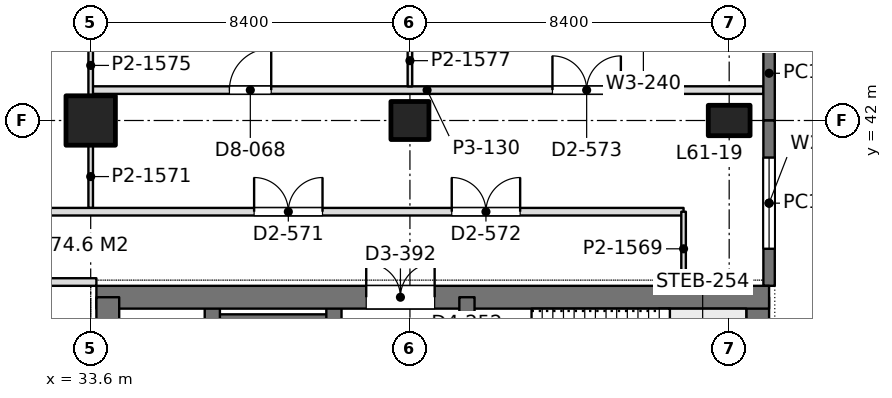
"""IFC4 building model, lengths in metres.
Left out: names, types, materials, properties, quantities, classifications, styles, units other than length and angle.
Written with IfcOpenShell. Run it as: python <this file> out.ifc"""

import sys

from ifc_helpers import new_model, si_unit, direction, frame, frame_2d, origin, origin_2d, place, context, subcontext, project, spatial, rectangle, extrude, element, fill, save


model = new_model("IFC4")
c1 = context("Model", 3, precision=1e-05, world=origin(), true_north=direction((0.0, 1.0)))
c2 = subcontext(c1, "Body", "Model", "MODEL_VIEW")
j1 = project(units=[si_unit("LENGTHUNIT", "METRE"), si_unit("PLANEANGLEUNIT", "RADIAN")], contexts=[c1])
p1 = place(None, origin())
s1 = spatial("IfcSite", under=j1, at=p1, CompositionType="ELEMENT")
p2 = place(p1, origin())
s2 = spatial("IfcBuilding", under=s1, at=p2, CompositionType="ELEMENT")
p3 = place(p2, frame((0.0, 0.0, 268.2)))
s3 = spatial("IfcBuildingStorey", under=s2, at=p3, CompositionType="ELEMENT", Elevation=268.2)
p4 = place(p3, frame((33.6, 42.0, 0.0), z_axis=(0.0, 0.0, 1.0), x_axis=(1.0, 0.0, 0.0)))
e1 = element("IfcColumn", 1, at=p4, inside=s3, PredefinedType="COLUMN", context=c2, shape_type="SweptSolid", body=[
    extrude(rectangle(XDim=1.3, YDim=1.3, at=origin_2d()), origin(), (0.0, 0.0, 1.0), 4.5),
])
p5 = place(p3, frame((42.0, 42.0, 0.0), z_axis=(0.0, 0.0, 1.0), x_axis=(1.0, 0.0, 0.0)))
e2 = element("IfcColumn", 2, at=p5, inside=s3, PredefinedType="COLUMN", context=c2, shape_type="SweptSolid", body=[
    extrude(rectangle(XDim=1.0, YDim=1.0, at=origin_2d()), origin(), (0.0, 0.0, 1.0), 4.5),
])
p6 = place(p3, frame((50.4, 42.0, 0.0), z_axis=(0.0, 0.0, 1.0), x_axis=(0.0, 1.0, 0.0)))
e3 = element("IfcColumn", 3, at=p6, inside=s3, PredefinedType="COLUMN", context=c2, shape_type="SweptSolid", body=[
    extrude(rectangle(XDim=0.8, YDim=1.1, at=origin_2d()), origin(), (0.0, 0.0, 1.0), 4.5),
])
p7 = place(p3, frame((33.75, 37.35, 0.0), z_axis=(0.0, 0.0, 1.0), x_axis=(1.0, 0.0, 0.0)))
e4 = element("IfcWall", 4, at=p7, inside=s3, PredefinedType="SHEAR", context=c2, shape_type="SweptSolid", body=[
    extrude(rectangle(XDim=17.7, YDim=0.6, at=frame_2d((8.85, 0.0))), origin(), (0.0, 0.0, 1.0), 4.5),
])
p8 = place(p7, frame((7.1, 0.0, 0.0)))
e5 = element("IfcOpeningElement", 5, at=p8, cuts=e4, PredefinedType="OPENING", context=c2, shape_type="SweptSolid", body=[
    extrude(rectangle(XDim=1.8, YDim=2.4, at=frame_2d((0.9, 1.2))), frame((0.0, 0.31, 0.0), z_axis=(0.0, -1.0, 0.0), x_axis=(1.0, 0.0, 0.0)), (0.0, 0.0, 1.0), 0.62),
])
p9 = place(p3, frame((34.05, 27.8, 0.0), z_axis=(0.0, 0.0, 1.0), x_axis=(0.0, 1.0, 0.0)))
e6 = element("IfcWall", 6, at=p9, inside=s3, PredefinedType="SHEAR", context=c2, shape_type="SweptSolid", body=[
    extrude(rectangle(XDim=9.55, YDim=0.6, at=frame_2d((4.775, 0.0))), origin(), (0.0, 0.0, 1.0), 4.5),
])
p10 = place(p3, frame((51.15, 13.05, 0.0), z_axis=(0.0, 0.0, 1.0), x_axis=(0.0, 1.0, 0.0)))
e7 = element("IfcWall", 7, at=p10, inside=s3, PredefinedType="SHEAR", context=c2, shape_type="SweptSolid", body=[
    extrude(rectangle(XDim=24.3, YDim=0.6, at=frame_2d((12.15, 0.0))), origin(), (0.0, 0.0, 1.0), 4.5),
])
p11 = place(p3, frame((43.5, 13.05, 0.0), z_axis=(0.0, 0.0, 1.0), x_axis=(0.0, 1.0, 0.0)))
e8 = element("IfcWall", 8, at=p11, inside=s3, PredefinedType="SHEAR", context=c2, shape_type="SweptSolid", body=[
    extrude(rectangle(XDim=24.3, YDim=0.4, at=frame_2d((12.15, 0.0))), origin(), (0.0, 0.0, 1.0), 4.5),
])
p12 = place(p11, frame((1.3, 0.0, 0.0)))
e9 = element("IfcOpeningElement", 9, at=p12, cuts=e8, PredefinedType="OPENING", context=c2, shape_type="SweptSolid", body=[
    extrude(rectangle(XDim=1.0, YDim=2.2, at=frame_2d((0.5, 1.1))), frame((0.0, 0.21, 0.0), z_axis=(0.0, -1.0, 0.0), x_axis=(1.0, 0.0, 0.0)), (0.0, 0.0, 1.0), 0.42),
])
p13 = place(p11, frame((22.0, 0.0, 0.0)))
e10 = element("IfcOpeningElement", 10, at=p13, cuts=e8, PredefinedType="OPENING", context=c2, shape_type="SweptSolid", body=[
    extrude(rectangle(XDim=1.0, YDim=2.2, at=frame_2d((0.5, 1.1))), frame((0.0, 0.21, 0.0), z_axis=(0.0, -1.0, 0.0), x_axis=(1.0, 0.0, 0.0)), (0.0, 0.0, 1.0), 0.42),
])
p14 = place(p11, frame((5.55, 0.0, 0.0)))
e11 = element("IfcOpeningElement", 11, at=p14, cuts=e8, PredefinedType="OPENING", context=c2, shape_type="SweptSolid", body=[
    extrude(rectangle(XDim=1.0, YDim=2.2, at=frame_2d((0.5, 1.1))), frame((0.0, 0.21, 0.0), z_axis=(0.0, -1.0, 0.0), x_axis=(1.0, 0.0, 0.0)), (0.0, 0.0, 1.0), 0.42),
])
p15 = place(p11, frame((9.55, 0.0, 0.0)))
e12 = element("IfcOpeningElement", 12, at=p15, cuts=e8, PredefinedType="OPENING", context=c2, shape_type="SweptSolid", body=[
    extrude(rectangle(XDim=1.0, YDim=2.2, at=frame_2d((0.5, 1.1))), frame((0.0, 0.21, 0.0), z_axis=(0.0, -1.0, 0.0), x_axis=(1.0, 0.0, 0.0)), (0.0, 0.0, 1.0), 0.42),
])
p16 = place(p11, frame((12.8, 0.0, 0.0)))
e13 = element("IfcOpeningElement", 13, at=p16, cuts=e8, PredefinedType="OPENING", context=c2, shape_type="SweptSolid", body=[
    extrude(rectangle(XDim=1.1, YDim=2.2, at=frame_2d((0.55, 1.1))), frame((0.0, 0.21, 0.0), z_axis=(0.0, -1.0, 0.0), x_axis=(1.0, 0.0, 0.0)), (0.0, 0.0, 1.0), 0.42),
])
p17 = place(p11, frame((15.538, 0.0, 0.0)))
e14 = element("IfcOpeningElement", 14, at=p17, cuts=e8, PredefinedType="OPENING", context=c2, shape_type="SweptSolid", body=[
    extrude(rectangle(XDim=1.1, YDim=2.2, at=frame_2d((0.55, 1.1))), frame((0.0, 0.21, 0.0), z_axis=(0.0, -1.0, 0.0), x_axis=(1.0, 0.0, 0.0)), (0.0, 0.0, 1.0), 0.42),
])
p18 = place(p11, frame((18.262, 0.0, 0.0)))
e15 = element("IfcOpeningElement", 15, at=p18, cuts=e8, PredefinedType="OPENING", context=c2, shape_type="SweptSolid", body=[
    extrude(rectangle(XDim=1.1, YDim=2.2, at=frame_2d((0.55, 1.1))), frame((0.0, 0.21, 0.0), z_axis=(0.0, -1.0, 0.0), x_axis=(1.0, 0.0, 0.0)), (0.0, 0.0, 1.0), 0.42),
])
p19 = place(p3, frame((40.0, 13.05, 0.0), z_axis=(0.0, 0.0, 1.0), x_axis=(0.0, 1.0, 0.0)))
e16 = element("IfcWall", 16, at=p19, inside=s3, PredefinedType="SHEAR", context=c2, shape_type="SweptSolid", body=[
    extrude(rectangle(XDim=24.3, YDim=0.4, at=frame_2d((12.15, 0.0))), origin(), (0.0, 0.0, 1.0), 4.5),
])
p20 = place(p19, frame((15.75, 0.0, 0.0)))
e17 = element("IfcOpeningElement", 17, at=p20, cuts=e16, PredefinedType="OPENING", context=c2, shape_type="SweptSolid", body=[
    extrude(rectangle(XDim=1.1, YDim=2.2, at=frame_2d((0.55, 1.1))), frame((0.0, 0.21, 0.0), z_axis=(0.0, -1.0, 0.0), x_axis=(1.0, 0.0, 0.0)), (0.0, 0.0, 1.0), 0.42),
])
p21 = place(p19, frame((18.6, 0.0, 0.0)))
e18 = element("IfcOpeningElement", 18, at=p21, cuts=e16, PredefinedType="OPENING", context=c2, shape_type="SweptSolid", body=[
    extrude(rectangle(XDim=1.1, YDim=2.2, at=frame_2d((0.55, 1.1))), frame((0.0, 0.21, 0.0), z_axis=(0.0, -1.0, 0.0), x_axis=(1.0, 0.0, 0.0)), (0.0, 0.0, 1.0), 0.42),
])
p22 = place(p19, frame((21.45, 0.0, 0.0)))
e19 = element("IfcOpeningElement", 19, at=p22, cuts=e16, PredefinedType="OPENING", context=c2, shape_type="SweptSolid", body=[
    extrude(rectangle(XDim=1.1, YDim=2.2, at=frame_2d((0.55, 1.1))), frame((0.0, 0.21, 0.0), z_axis=(0.0, -1.0, 0.0), x_axis=(1.0, 0.0, 0.0)), (0.0, 0.0, 1.0), 0.42),
])
p23 = place(p19, frame((8.65, 0.0, 0.0)))
e20 = element("IfcOpeningElement", 20, at=p23, cuts=e16, PredefinedType="OPENING", context=c2, shape_type="SweptSolid", body=[
    extrude(rectangle(XDim=1.8, YDim=2.4, at=frame_2d((0.9, 1.2))), frame((0.0, 0.21, 0.0), z_axis=(0.0, -1.0, 0.0), x_axis=(1.0, 0.0, 0.0)), (0.0, 0.0, 1.0), 0.42),
])
p24 = place(p19, frame((1.5, 0.0, 0.0)))
e21 = element("IfcOpeningElement", 21, at=p24, cuts=e16, PredefinedType="OPENING", context=c2, shape_type="SweptSolid", body=[
    extrude(rectangle(XDim=1.8, YDim=2.4, at=frame_2d((0.9, 1.2))), frame((0.0, 0.21, 0.0), z_axis=(0.0, -1.0, 0.0), x_axis=(1.0, 0.0, 0.0)), (0.0, 0.0, 1.0), 0.42),
])
p25 = place(p3, frame((36.8, 27.925, 0.0), z_axis=(0.0, 0.0, 1.0), x_axis=(0.0, 1.0, 0.0)))
e22 = element("IfcWall", 22, at=p25, inside=s3, PredefinedType="SHEAR", context=c2, shape_type="SweptSolid", body=[
    extrude(rectangle(XDim=9.425, YDim=0.4, at=frame_2d((4.712, 0.0))), origin(), (0.0, 0.0, 1.0), 4.5),
])
p26 = place(p3, frame((40.0, 36.625, 0.0), z_axis=(0.0, 0.0, 1.0), x_axis=(-1.0, 0.0, 0.0)))
e23 = element("IfcWall", 23, at=p26, inside=s3, PredefinedType="SHEAR", context=c2, shape_type="SweptSolid", body=[
    extrude(rectangle(XDim=3.2, YDim=0.55, at=frame_2d((1.6, 0.0))), origin(), (0.0, 0.0, 1.0), 4.5),
])
p27 = place(p3, frame((51.45, 44.485, 0.0), z_axis=(0.0, 0.0, 1.0), x_axis=(0.0, -1.0, 0.0)))
e24 = element("IfcWall", 24, at=p27, inside=s3, PredefinedType="SOLIDWALL", context=c2, shape_type="SweptSolid", body=[
    extrude(rectangle(XDim=2.485, YDim=0.3, at=frame_2d((1.243, 0.0))), origin(), (0.0, 0.0, 1.0), 4.35),
])
p28 = place(p3, frame((51.45, 42.0, 0.0), z_axis=(0.0, 0.0, 1.0), x_axis=(0.0, -1.0, 0.0)))
e25 = element("IfcWall", 25, at=p28, inside=s3, PredefinedType="SOLIDWALL", context=c2, shape_type="SweptSolid", body=[
    extrude(rectangle(XDim=4.35, YDim=0.3, at=frame_2d((2.175, 0.0))), origin(), (0.0, 0.0, 1.0), 4.35),
])
p29 = place(p28, frame((0.975, 0.0, 0.9)))
e26 = element("IfcOpeningElement", 26, at=p29, cuts=e25, PredefinedType="OPENING", context=c2, shape_type="SweptSolid", body=[
    extrude(rectangle(XDim=2.4, YDim=1.9, at=frame_2d((1.2, 0.95))), frame((0.0, 0.16, 0.0), z_axis=(0.0, -1.0, 0.0), x_axis=(1.0, 0.0, 0.0)), (0.0, 0.0, 1.0), 0.32),
])
p30 = place(p3, frame((33.6, 42.8, 0.0), z_axis=(0.0, 0.0, 1.0), x_axis=(1.0, 0.0, 0.0)))
e27 = element("IfcWall", 27, at=p30, inside=s3, PredefinedType="PARTITIONING", context=c2, shape_type="SweptSolid", body=[
    extrude(rectangle(XDim=17.702, YDim=0.2, at=frame_2d((8.851, 0.0))), origin(), (0.0, 0.0, 1.0), 3.86),
])
p31 = place(p30, frame((3.65, 0.0, 0.0)))
e28 = element("IfcOpeningElement", 28, at=p31, cuts=e27, PredefinedType="OPENING", context=c2, shape_type="SweptSolid", body=[
    extrude(rectangle(XDim=1.1, YDim=2.4, at=frame_2d((0.55, 1.2))), frame((0.0, 0.11, 0.0), z_axis=(0.0, -1.0, 0.0), x_axis=(1.0, 0.0, 0.0)), (0.0, 0.0, 1.0), 0.22),
])
p32 = place(p30, frame((12.15, 0.0, 0.0)))
e29 = element("IfcOpeningElement", 29, at=p32, cuts=e27, PredefinedType="OPENING", context=c2, shape_type="SweptSolid", body=[
    extrude(rectangle(XDim=1.8, YDim=2.2, at=frame_2d((0.9, 1.1))), frame((0.0, 0.11, 0.0), z_axis=(0.0, -1.0, 0.0), x_axis=(1.0, 0.0, 0.0)), (0.0, 0.0, 1.0), 0.22),
])
p33 = place(p3, frame((33.6, 42.648, 0.0), z_axis=(0.0, 0.0, 1.0), x_axis=(0.0, 1.0, 0.0)))
e30 = element("IfcWall", 30, at=p33, inside=s3, PredefinedType="PARTITIONING", context=c2, shape_type="SweptSolid", body=[
    extrude(rectangle(XDim=1.603, YDim=0.12, at=frame_2d((0.802, 0.0))), origin(), (0.0, 0.0, 1.0), 3.99),
])
p34 = place(p3, frame((42.0, 42.898, 0.0), z_axis=(0.0, 0.0, 1.0), x_axis=(0.0, 1.0, 0.0)))
e31 = element("IfcWall", 31, at=p34, inside=s3, PredefinedType="PARTITIONING", context=c2, shape_type="SweptSolid", body=[
    extrude(rectangle(XDim=1.353, YDim=0.12, at=frame_2d((0.677, 0.0))), origin(), (0.0, 0.0, 1.0), 3.99),
])
p35 = place(p3, frame((33.6, 39.698, 0.0), z_axis=(0.0, 0.0, 1.0), x_axis=(0.0, 1.0, 0.0)))
e32 = element("IfcWall", 32, at=p35, inside=s3, PredefinedType="PARTITIONING", context=c2, shape_type="SweptSolid", body=[
    extrude(rectangle(XDim=1.653, YDim=0.12, at=frame_2d((0.827, 0.0))), origin(), (0.0, 0.0, 1.0), 3.99),
])
p36 = place(p3, frame((7.748, 39.6, 0.0), z_axis=(0.0, 0.0, 1.0), x_axis=(1.0, 0.0, 0.0)))
e33 = element("IfcWall", 33, at=p36, inside=s3, PredefinedType="PARTITIONING", context=c2, shape_type="SweptSolid", body=[
    extrude(rectangle(XDim=41.452, YDim=0.2, at=frame_2d((20.726, 0.0))), origin(), (0.0, 0.0, 1.0), 3.8),
])
p37 = place(p36, frame((2.119, 0.0, 0.0)))
e34 = element("IfcOpeningElement", 34, at=p37, cuts=e33, PredefinedType="OPENING", context=c2, shape_type="SweptSolid", body=[
    extrude(rectangle(XDim=1.8, YDim=2.2, at=frame_2d((0.9, 1.1))), frame((0.0, 0.11, 0.0), z_axis=(0.0, -1.0, 0.0), x_axis=(1.0, 0.0, 0.0)), (0.0, 0.0, 1.0), 0.22),
])
p38 = place(p36, frame((5.135, 0.0, 0.0)))
e35 = element("IfcOpeningElement", 35, at=p38, cuts=e33, PredefinedType="OPENING", context=c2, shape_type="SweptSolid", body=[
    extrude(rectangle(XDim=1.8, YDim=2.2, at=frame_2d((0.9, 1.1))), frame((0.0, 0.11, 0.0), z_axis=(0.0, -1.0, 0.0), x_axis=(1.0, 0.0, 0.0)), (0.0, 0.0, 1.0), 0.22),
])
p39 = place(p36, frame((12.352, 0.0, 0.0)))
e36 = element("IfcOpeningElement", 36, at=p39, cuts=e33, PredefinedType="OPENING", context=c2, shape_type="SweptSolid", body=[
    extrude(rectangle(XDim=1.8, YDim=2.2, at=frame_2d((0.9, 1.1))), frame((0.0, 0.11, 0.0), z_axis=(0.0, -1.0, 0.0), x_axis=(1.0, 0.0, 0.0)), (0.0, 0.0, 1.0), 0.22),
])
p40 = place(p36, frame((20.752, 0.0, 0.0)))
e37 = element("IfcOpeningElement", 37, at=p40, cuts=e33, PredefinedType="OPENING", context=c2, shape_type="SweptSolid", body=[
    extrude(rectangle(XDim=1.8, YDim=2.2, at=frame_2d((0.9, 1.1))), frame((0.0, 0.11, 0.0), z_axis=(0.0, -1.0, 0.0), x_axis=(1.0, 0.0, 0.0)), (0.0, 0.0, 1.0), 0.22),
])
p41 = place(p36, frame((30.152, 0.0, 0.0)))
e38 = element("IfcOpeningElement", 38, at=p41, cuts=e33, PredefinedType="OPENING", context=c2, shape_type="SweptSolid", body=[
    extrude(rectangle(XDim=1.8, YDim=2.2, at=frame_2d((0.9, 1.1))), frame((0.0, 0.11, 0.0), z_axis=(0.0, -1.0, 0.0), x_axis=(1.0, 0.0, 0.0)), (0.0, 0.0, 1.0), 0.22),
])
p42 = place(p36, frame((35.352, 0.0, 0.0)))
e39 = element("IfcOpeningElement", 39, at=p42, cuts=e33, PredefinedType="OPENING", context=c2, shape_type="SweptSolid", body=[
    extrude(rectangle(XDim=1.8, YDim=2.2, at=frame_2d((0.9, 1.1))), frame((0.0, 0.11, 0.0), z_axis=(0.0, -1.0, 0.0), x_axis=(1.0, 0.0, 0.0)), (0.0, 0.0, 1.0), 0.22),
])
p43 = place(p3, frame((49.2, 37.648, 0.0), z_axis=(0.0, 0.0, 1.0), x_axis=(0.0, 1.0, 0.0)))
e40 = element("IfcWall", 40, at=p43, inside=s3, PredefinedType="PARTITIONING", context=c2, shape_type="SweptSolid", body=[
    extrude(rectangle(XDim=1.952, YDim=0.12, at=frame_2d((0.976, 0.0))), origin(), (0.0, 0.0, 1.0), 4.35),
])
p44 = place(p3, frame((16.65, 37.75, 0.0), z_axis=(0.0, 0.0, 1.0), x_axis=(1.0, 0.0, 0.0)))
e41 = element("IfcWall", 41, at=p44, inside=s3, PredefinedType="PARTITIONING", context=c2, shape_type="SweptSolid", body=[
    extrude(rectangle(XDim=17.1, YDim=0.2, at=frame_2d((8.55, 0.0))), origin(), (0.0, 0.0, 1.0), 3.8),
])
p45 = place(p44, frame((2.32, 0.0, 0.0)))
e42 = element("IfcOpeningElement", 42, at=p45, cuts=e41, PredefinedType="OPENING", context=c2, shape_type="SweptSolid", body=[
    extrude(rectangle(XDim=1.1, YDim=2.4, at=frame_2d((0.55, 1.2))), frame((0.0, 0.11, 0.0), z_axis=(0.0, -1.0, 0.0), x_axis=(1.0, 0.0, 0.0)), (0.0, 0.0, 1.0), 0.22),
])
p46 = place(p44, frame((10.72, 0.0, 0.0)))
e43 = element("IfcOpeningElement", 43, at=p46, cuts=e41, PredefinedType="OPENING", context=c2, shape_type="SweptSolid", body=[
    extrude(rectangle(XDim=1.1, YDim=2.4, at=frame_2d((0.55, 1.2))), frame((0.0, 0.11, 0.0), z_axis=(0.0, -1.0, 0.0), x_axis=(1.0, 0.0, 0.0)), (0.0, 0.0, 1.0), 0.22),
])
p47 = place(p29, origin())
e44 = element("IfcWindow", 44, at=p47, inside=s3, PartitioningType="SINGLE_PANEL", PredefinedType="WINDOW", context=c2, shape_type="SweptSolid", body=[
    extrude(rectangle(XDim=2.4, YDim=1.9, at=frame_2d((1.2, 0.95))), frame((0.0, 0.03, 0.0), z_axis=(0.0, -1.0, 0.0), x_axis=(1.0, 0.0, 0.0)), (0.0, 0.0, 1.0), 0.06),
])
fill(e26, e44)
p48 = place(p8, origin())
e45 = element("IfcDoor", 45, at=p48, inside=s3, OperationType="DOUBLE_DOOR_SINGLE_SWING", PredefinedType="DOOR", context=c2, shape_type="SweptSolid", body=[
    extrude(rectangle(XDim=1.8, YDim=2.4, at=frame_2d((0.9, 1.2))), frame((0.0, 0.025, 0.0), z_axis=(0.0, -1.0, 0.0), x_axis=(1.0, 0.0, 0.0)), (0.0, 0.0, 1.0), 0.05),
])
fill(e5, e45)
p49 = place(p31, origin())
e46 = element("IfcDoor", 46, at=p49, inside=s3, OperationType="SINGLE_SWING_RIGHT", PredefinedType="DOOR", context=c2, shape_type="SweptSolid", body=[
    extrude(rectangle(XDim=1.1, YDim=2.4, at=frame_2d((0.55, 1.2))), frame((0.0, 0.025, 0.0), z_axis=(0.0, -1.0, 0.0), x_axis=(1.0, 0.0, 0.0)), (0.0, 0.0, 1.0), 0.05),
])
fill(e28, e46)
p50 = place(p32, origin())
e47 = element("IfcDoor", 47, at=p50, inside=s3, OperationType="DOUBLE_DOOR_SINGLE_SWING", PredefinedType="DOOR", context=c2, shape_type="SweptSolid", body=[
    extrude(rectangle(XDim=1.8, YDim=2.2, at=frame_2d((0.9, 1.1))), frame((0.0, 0.025, 0.0), z_axis=(0.0, -1.0, 0.0), x_axis=(1.0, 0.0, 0.0)), (0.0, 0.0, 1.0), 0.05),
])
fill(e29, e47)
p51 = place(p41, origin())
e48 = element("IfcDoor", 48, at=p51, inside=s3, OperationType="DOUBLE_DOOR_SINGLE_SWING", PredefinedType="DOOR", context=c2, shape_type="SweptSolid", body=[
    extrude(rectangle(XDim=1.8, YDim=2.2, at=frame_2d((0.9, 1.1))), frame((0.0, 0.025, 0.0), z_axis=(0.0, -1.0, 0.0), x_axis=(1.0, 0.0, 0.0)), (0.0, 0.0, 1.0), 0.05),
])
fill(e38, e48)
p52 = place(p42, origin())
e49 = element("IfcDoor", 49, at=p52, inside=s3, OperationType="DOUBLE_DOOR_SINGLE_SWING", PredefinedType="DOOR", context=c2, shape_type="SweptSolid", body=[
    extrude(rectangle(XDim=1.8, YDim=2.2, at=frame_2d((0.9, 1.1))), frame((0.0, 0.025, 0.0), z_axis=(0.0, -1.0, 0.0), x_axis=(1.0, 0.0, 0.0)), (0.0, 0.0, 1.0), 0.05),
])
fill(e39, e49)
save(model, sys.argv[1])
